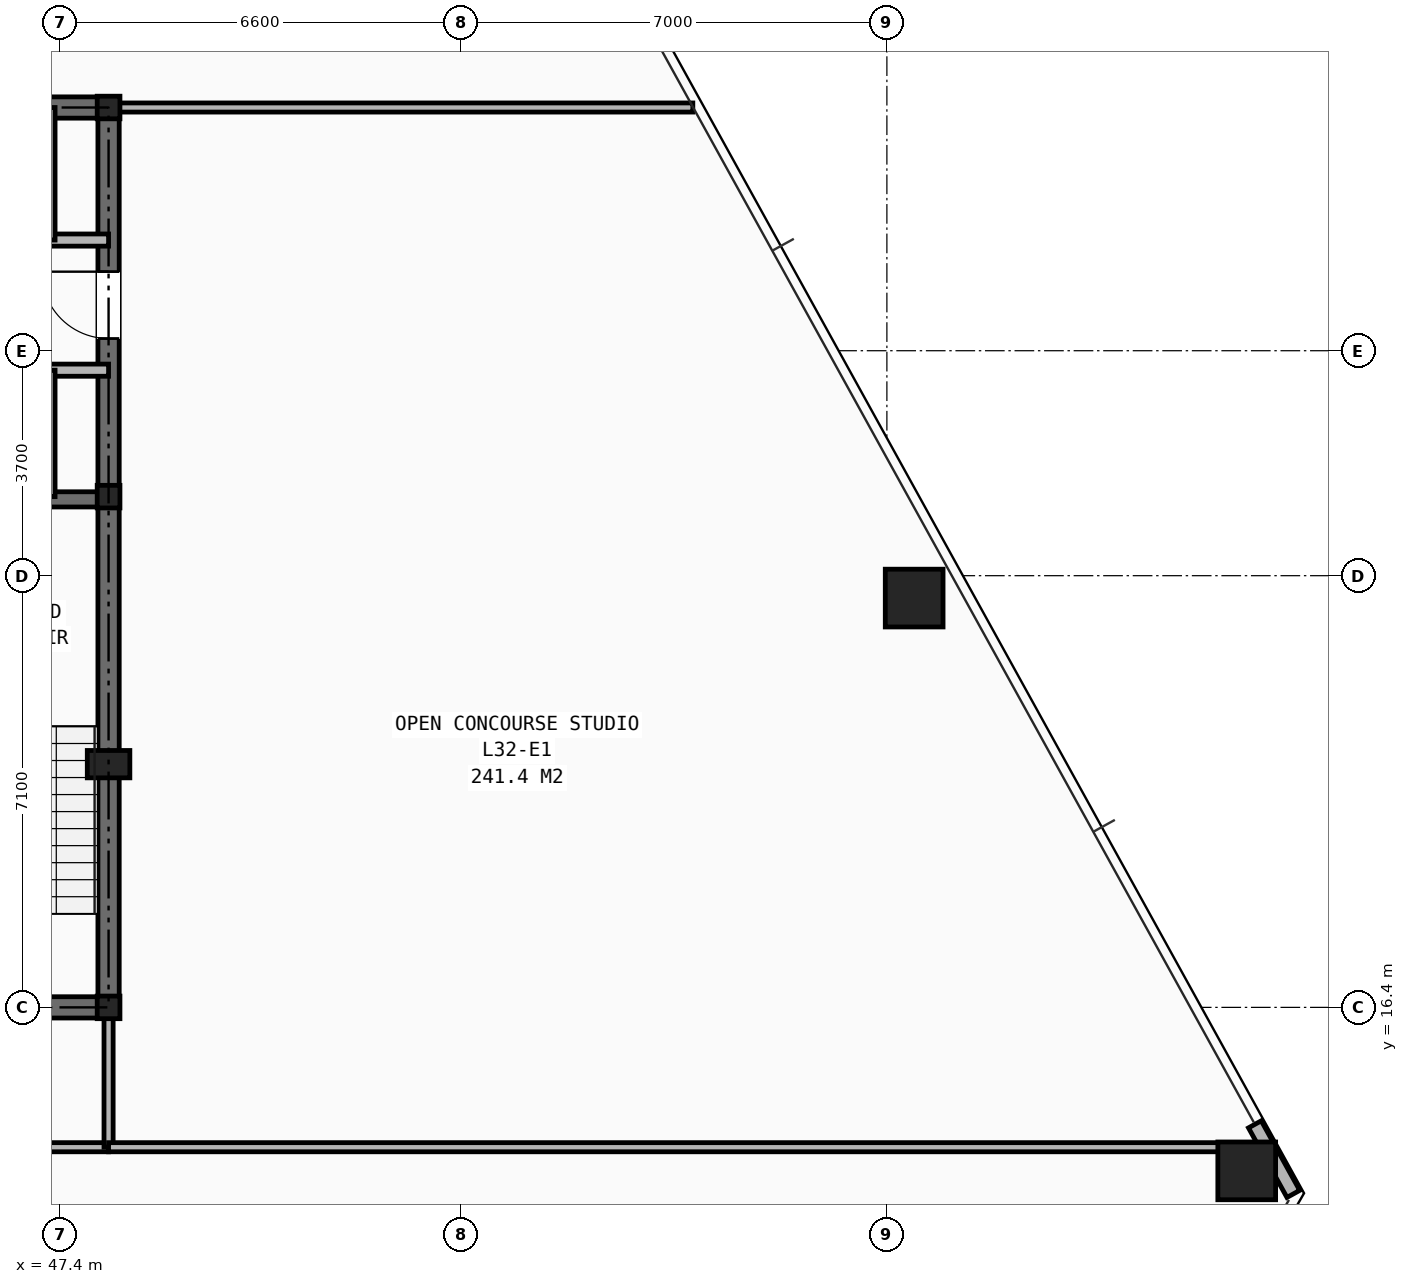
"""IFC4 building model, lengths in metres.
Left out: names, types, materials, properties, quantities, classifications, styles, units other than length and angle.
Written with IfcOpenShell. Run it as: python <this file> out.ifc"""

import sys

from ifc_helpers import new_model, si_unit, direction, frame, frame_2d, origin, origin_2d, place, context, subcontext, project, spatial, rectangle, hollow_rectangle, i_section, extrude, element, fill, save


model = new_model("IFC4")
c1 = context("Model", 3, precision=1e-05, world=origin(), true_north=direction((0.0, 1.0)))
c2 = subcontext(c1, "Body", "Model", "MODEL_VIEW")
j1 = project(units=[si_unit("LENGTHUNIT", "METRE"), si_unit("PLANEANGLEUNIT", "RADIAN")], contexts=[c1])
p1 = place(None, origin())
s1 = spatial("IfcSite", under=j1, at=p1, CompositionType="ELEMENT")
p2 = place(p1, origin())
s2 = spatial("IfcBuilding", under=s1, at=p2, CompositionType="ELEMENT")
p3 = place(p2, frame((0.0, 0.0, 111.8)))
s3 = spatial("IfcBuildingStorey", under=s2, at=p3, CompositionType="ELEMENT", Elevation=111.8)
for number, where, z_axis, x_axis in (
    (1, (48.2, 16.4, 0.0), (0.0, 0.0, 1.0), (1.0, 0.0, 0.0)),
    (2, (48.2, 24.8, 0.0), (0.0, 0.0, 1.0), (1.0, 0.0, 0.0)),
    (3, (48.2, 31.2, 0.0), (0.0, 0.0, 1.0), (1.0, 0.0, 0.0)),
):
    element("IfcColumn", number, at=place(p3, frame(where, z_axis=z_axis, x_axis=x_axis)), inside=s3, PredefinedType="COLUMN", context=c2, shape_type="SweptSolid", body=[
        extrude(i_section(OverallWidth=0.374, OverallDepth=0.372, WebThickness=0.016, FlangeThickness=0.026, at=origin_2d()), origin(), (0.0, 0.0, 1.0), 4.2),
    ])
p4 = place(p3, frame((48.2, 20.4, 0.0), z_axis=(0.0, 0.0, 1.0), x_axis=(1.0, 0.0, 0.0)))
e4 = element("IfcColumn", 4, at=p4, inside=s3, PredefinedType="PILASTER", context=c2, shape_type="SweptSolid", body=[
    extrude(rectangle(XDim=0.7, YDim=0.45, at=origin_2d()), origin(), (0.0, 0.0, 1.0), 4.2),
])
for number, where, z_axis, x_axis in (
    (5, (66.918, 13.711, 0.0), (0.0, 0.0, 1.0), (1.0, 0.0, 0.0)),
    (6, (61.448, 23.132, 0.0), (0.0, 0.0, 1.0), (1.0, 0.0, 0.0)),
):
    element("IfcColumn", number, at=place(p3, frame(where, z_axis=z_axis, x_axis=x_axis)), inside=s3, PredefinedType="COLUMN", context=c2, shape_type="SweptSolid", body=[
        extrude(hollow_rectangle(XDim=0.95, YDim=0.95, WallThickness=0.065, at=origin_2d()), origin(), (0.0, 0.0, 1.0), 4.2),
    ])
p5 = place(p3, frame((67.685, 13.332, 0.0), z_axis=(0.0, 0.0, 1.0), x_axis=(-0.483580718164, 0.875299770947, 0.0)))
e7 = element("IfcWall", 7, at=p5, inside=s3, PredefinedType="SHEAR", context=c2, shape_type="SweptSolid", body=[
    extrude(rectangle(XDim=1.308, YDim=0.24, at=frame_2d((0.654, 0.0))), origin(), (0.0, 0.0, 1.0), 3.243),
])
p6 = place(p3, frame((31.8, 16.4, 0.0), z_axis=(0.0, 0.0, 1.0), x_axis=(1.0, 0.0, 0.0)))
e8 = element("IfcWall", 8, at=p6, inside=s3, PredefinedType="SHEAR", context=c2, shape_type="SweptSolid", body=[
    extrude(rectangle(XDim=16.4, YDim=0.35, at=frame_2d((8.2, 0.0))), origin(), (0.0, 0.0, 1.0), 3.96),
])
p7 = place(p6, frame((7.75, 0.0, 0.0)))
e9 = element("IfcOpeningElement", 9, at=p7, cuts=e8, PredefinedType="OPENING", context=c2, shape_type="SweptSolid", body=[
    extrude(rectangle(XDim=0.9, YDim=2.1, at=frame_2d((0.45, 1.05))), frame((0.0, 0.185, 0.0), z_axis=(0.0, -1.0, 0.0), x_axis=(1.0, 0.0, 0.0)), (0.0, 0.0, 1.0), 0.37),
])
p8 = place(p6, frame((4.2, 0.0, 0.0)))
e10 = element("IfcOpeningElement", 10, at=p8, cuts=e8, PredefinedType="OPENING", context=c2, shape_type="SweptSolid", body=[
    extrude(rectangle(XDim=0.95, YDim=2.1, at=frame_2d((0.475, 1.05))), frame((0.0, 0.185, 0.0), z_axis=(0.0, -1.0, 0.0), x_axis=(1.0, 0.0, 0.0)), (0.0, 0.0, 1.0), 0.37),
])
p9 = place(p6, frame((10.6, 0.0, 0.0)))
e11 = element("IfcOpeningElement", 11, at=p9, cuts=e8, PredefinedType="OPENING", context=c2, shape_type="SweptSolid", body=[
    extrude(rectangle(XDim=0.95, YDim=2.1, at=frame_2d((0.475, 1.05))), frame((0.0, 0.185, 0.0), z_axis=(0.0, -1.0, 0.0), x_axis=(1.0, 0.0, 0.0)), (0.0, 0.0, 1.0), 0.37),
])
p10 = place(p3, frame((31.8, 31.2, 0.0), z_axis=(0.0, 0.0, 1.0), x_axis=(1.0, 0.0, 0.0)))
e12 = element("IfcWall", 12, at=p10, inside=s3, PredefinedType="SHEAR", context=c2, shape_type="SweptSolid", body=[
    extrude(rectangle(XDim=16.4, YDim=0.35, at=frame_2d((8.2, 0.0))), origin(), (0.0, 0.0, 1.0), 3.96),
])
p11 = place(p3, frame((48.2, 16.4, 0.0), z_axis=(0.0, 0.0, 1.0), x_axis=(0.0, 1.0, 0.0)))
e13 = element("IfcWall", 13, at=p11, inside=s3, PredefinedType="SHEAR", context=c2, shape_type="SweptSolid", body=[
    extrude(rectangle(XDim=14.8, YDim=0.35, at=frame_2d((7.4, 0.0))), origin(), (0.0, 0.0, 1.0), 3.96),
])
p12 = place(p11, frame((11.0, 0.0, 0.0)))
e14 = element("IfcOpeningElement", 14, at=p12, cuts=e13, PredefinedType="OPENING", context=c2, shape_type="SweptSolid", body=[
    extrude(rectangle(XDim=1.1, YDim=2.15, at=frame_2d((0.55, 1.075))), frame((0.0, 0.185, 0.0), z_axis=(0.0, -1.0, 0.0), x_axis=(1.0, 0.0, 0.0)), (0.0, 0.0, 1.0), 0.37),
])
p13 = place(p3, frame((44.955, 24.755, 0.0), z_axis=(0.0, 0.0, 1.0), x_axis=(1.0, 0.0, 0.0)))
e15 = element("IfcWall", 15, at=p13, inside=s3, PredefinedType="SHEAR", context=c2, shape_type="SweptSolid", body=[
    extrude(rectangle(XDim=3.245, YDim=0.25, at=frame_2d((1.623, 0.0))), origin(), (0.0, 0.0, 1.0), 3.96),
])
p14 = place(p3, frame((33.82, 29.02, 0.0), z_axis=(0.0, 0.0, 1.0), x_axis=(1.0, 0.0, 0.0)))
e16 = element("IfcWall", 16, at=p14, inside=s3, PredefinedType="SOLIDWALL", context=c2, shape_type="SweptSolid", body=[
    extrude(rectangle(XDim=14.38, YDim=0.2, at=frame_2d((7.19, 0.0))), origin(), (0.0, 0.0, 1.0), 3.411),
])
p15 = place(p14, frame((0.53, 0.0, 0.0)))
e17 = element("IfcOpeningElement", 17, at=p15, cuts=e16, PredefinedType="OPENING", context=c2, shape_type="SweptSolid", body=[
    extrude(rectangle(XDim=1.1, YDim=2.15, at=frame_2d((0.55, 1.075))), frame((0.0, 0.11, 0.0), z_axis=(0.0, -1.0, 0.0), x_axis=(1.0, 0.0, 0.0)), (0.0, 0.0, 1.0), 0.22),
])
p16 = place(p14, frame((2.69, 0.0, 0.0)))
e18 = element("IfcOpeningElement", 18, at=p16, cuts=e16, PredefinedType="OPENING", context=c2, shape_type="SweptSolid", body=[
    extrude(rectangle(XDim=1.1, YDim=2.15, at=frame_2d((0.55, 1.075))), frame((0.0, 0.11, 0.0), z_axis=(0.0, -1.0, 0.0), x_axis=(1.0, 0.0, 0.0)), (0.0, 0.0, 1.0), 0.22),
])
p17 = place(p14, frame((4.85, 0.0, 0.0)))
e19 = element("IfcOpeningElement", 19, at=p17, cuts=e16, PredefinedType="OPENING", context=c2, shape_type="SweptSolid", body=[
    extrude(rectangle(XDim=1.1, YDim=2.15, at=frame_2d((0.55, 1.075))), frame((0.0, 0.11, 0.0), z_axis=(0.0, -1.0, 0.0), x_axis=(1.0, 0.0, 0.0)), (0.0, 0.0, 1.0), 0.22),
])
p18 = place(p14, frame((7.01, 0.0, 0.0)))
e20 = element("IfcOpeningElement", 20, at=p18, cuts=e16, PredefinedType="OPENING", context=c2, shape_type="SweptSolid", body=[
    extrude(rectangle(XDim=1.1, YDim=2.15, at=frame_2d((0.55, 1.075))), frame((0.0, 0.11, 0.0), z_axis=(0.0, -1.0, 0.0), x_axis=(1.0, 0.0, 0.0)), (0.0, 0.0, 1.0), 0.22),
])
p19 = place(p3, frame((31.8, 26.88, 0.0), z_axis=(0.0, 0.0, 1.0), x_axis=(1.0, 0.0, 0.0)))
e21 = element("IfcWall", 21, at=p19, inside=s3, PredefinedType="SOLIDWALL", context=c2, shape_type="SweptSolid", body=[
    extrude(rectangle(XDim=16.4, YDim=0.2, at=frame_2d((8.2, 0.0))), origin(), (0.0, 0.0, 1.0), 3.411),
])
p20 = place(p19, frame((0.55, 0.0, 0.0)))
e22 = element("IfcOpeningElement", 22, at=p20, cuts=e21, PredefinedType="OPENING", context=c2, shape_type="SweptSolid", body=[
    extrude(rectangle(XDim=0.85, YDim=2.05, at=frame_2d((0.425, 1.025))), frame((0.0, 0.11, 0.0), z_axis=(0.0, -1.0, 0.0), x_axis=(1.0, 0.0, 0.0)), (0.0, 0.0, 1.0), 0.22),
])
p21 = place(p19, frame((2.55, 0.0, 0.0)))
e23 = element("IfcOpeningElement", 23, at=p21, cuts=e21, PredefinedType="OPENING", context=c2, shape_type="SweptSolid", body=[
    extrude(rectangle(XDim=1.1, YDim=2.15, at=frame_2d((0.55, 1.075))), frame((0.0, 0.11, 0.0), z_axis=(0.0, -1.0, 0.0), x_axis=(1.0, 0.0, 0.0)), (0.0, 0.0, 1.0), 0.22),
])
p22 = place(p19, frame((4.71, 0.0, 0.0)))
e24 = element("IfcOpeningElement", 24, at=p22, cuts=e21, PredefinedType="OPENING", context=c2, shape_type="SweptSolid", body=[
    extrude(rectangle(XDim=1.1, YDim=2.15, at=frame_2d((0.55, 1.075))), frame((0.0, 0.11, 0.0), z_axis=(0.0, -1.0, 0.0), x_axis=(1.0, 0.0, 0.0)), (0.0, 0.0, 1.0), 0.22),
])
p23 = place(p19, frame((6.87, 0.0, 0.0)))
e25 = element("IfcOpeningElement", 25, at=p23, cuts=e21, PredefinedType="OPENING", context=c2, shape_type="SweptSolid", body=[
    extrude(rectangle(XDim=1.1, YDim=2.15, at=frame_2d((0.55, 1.075))), frame((0.0, 0.11, 0.0), z_axis=(0.0, -1.0, 0.0), x_axis=(1.0, 0.0, 0.0)), (0.0, 0.0, 1.0), 0.22),
])
p24 = place(p19, frame((9.03, 0.0, 0.0)))
e26 = element("IfcOpeningElement", 26, at=p24, cuts=e21, PredefinedType="OPENING", context=c2, shape_type="SweptSolid", body=[
    extrude(rectangle(XDim=1.1, YDim=2.15, at=frame_2d((0.55, 1.075))), frame((0.0, 0.11, 0.0), z_axis=(0.0, -1.0, 0.0), x_axis=(1.0, 0.0, 0.0)), (0.0, 0.0, 1.0), 0.22),
])
p25 = place(p3, frame((47.24, 29.02, 0.0), z_axis=(0.0, 0.0, 1.0), x_axis=(0.0, 1.0, 0.0)))
e27 = element("IfcWall", 27, at=p25, inside=s3, PredefinedType="SOLIDWALL", context=c2, shape_type="SweptSolid", body=[
    extrude(rectangle(XDim=2.18, YDim=0.16, at=frame_2d((1.09, 0.0))), origin(), (0.0, 0.0, 1.0), 3.411),
])
p26 = place(p3, frame((47.24, 24.8, 0.0), z_axis=(0.0, 0.0, 1.0), x_axis=(0.0, 1.0, 0.0)))
e28 = element("IfcWall", 28, at=p26, inside=s3, PredefinedType="SOLIDWALL", context=c2, shape_type="SweptSolid", body=[
    extrude(rectangle(XDim=2.08, YDim=0.16, at=frame_2d((1.04, 0.0))), origin(), (0.0, 0.0, 1.0), 3.96),
])
p27 = place(p3, frame((29.6, 14.1, 0.0), z_axis=(0.0, 0.0, 1.0), x_axis=(1.0, 0.0, 0.0)))
e29 = element("IfcWall", 29, at=p27, inside=s3, PredefinedType="PARTITIONING", context=c2, shape_type="SweptSolid", body=[
    extrude(rectangle(XDim=18.6, YDim=0.15, at=frame_2d((9.3, 0.0))), origin(), (0.0, 0.0, 1.0), 2.975),
])
p28 = place(p27, frame((0.55, 0.0, 0.0)))
e30 = element("IfcOpeningElement", 30, at=p28, cuts=e29, PredefinedType="OPENING", context=c2, shape_type="SweptSolid", body=[
    extrude(rectangle(XDim=0.95, YDim=2.1, at=frame_2d((0.475, 1.05))), frame((0.0, 0.085, 0.0), z_axis=(0.0, -1.0, 0.0), x_axis=(1.0, 0.0, 0.0)), (0.0, 0.0, 1.0), 0.17),
])
p29 = place(p27, frame((9.75, 0.0, 0.0)))
e31 = element("IfcOpeningElement", 31, at=p29, cuts=e29, PredefinedType="OPENING", context=c2, shape_type="SweptSolid", body=[
    extrude(rectangle(XDim=0.95, YDim=2.1, at=frame_2d((0.475, 1.05))), frame((0.0, 0.085, 0.0), z_axis=(0.0, -1.0, 0.0), x_axis=(1.0, 0.0, 0.0)), (0.0, 0.0, 1.0), 0.17),
])
p30 = place(p3, frame((48.2, 14.1, 0.0), z_axis=(0.0, 0.0, 1.0), x_axis=(0.0, 1.0, 0.0)))
e32 = element("IfcWall", 32, at=p30, inside=s3, PredefinedType="PARTITIONING", context=c2, shape_type="SweptSolid", body=[
    extrude(rectangle(XDim=2.3, YDim=0.15, at=frame_2d((1.15, 0.0))), origin(), (0.0, 0.0, 1.0), 3.411),
])
p31 = place(p3, frame((48.2, 31.2, 0.0), z_axis=(0.0, 0.0, 1.0), x_axis=(1.0, 0.0, 0.0)))
e33 = element("IfcWall", 33, at=p31, inside=s3, PredefinedType="PARTITIONING", context=c2, shape_type="SweptSolid", body=[
    extrude(rectangle(XDim=9.609, YDim=0.15, at=frame_2d((4.804, 0.0))), origin(), (0.0, 0.0, 1.0), 2.975),
])
p32 = place(p3, frame((48.2, 14.1, 0.0), z_axis=(0.0, 0.0, 1.0), x_axis=(1.0, 0.0, 0.0)))
e34 = element("IfcWall", 34, at=p32, inside=s3, PredefinedType="PARTITIONING", context=c2, shape_type="SweptSolid", body=[
    extrude(rectangle(XDim=19.054, YDim=0.15, at=frame_2d((9.527, 0.0))), origin(), (0.0, 0.0, 1.0), 2.975),
])
p33 = place(p12, origin())
e35 = element("IfcDoor", 35, at=p33, inside=s3, OperationType="SINGLE_SWING_RIGHT", PredefinedType="DOOR", context=c2, shape_type="SweptSolid", body=[
    extrude(rectangle(XDim=1.1, YDim=2.15, at=frame_2d((0.55, 1.075))), frame((0.0, 0.025, 0.0), z_axis=(0.0, -1.0, 0.0), x_axis=(1.0, 0.0, 0.0)), (0.0, 0.0, 1.0), 0.05),
])
fill(e14, e35)
save(model, sys.argv[1])
